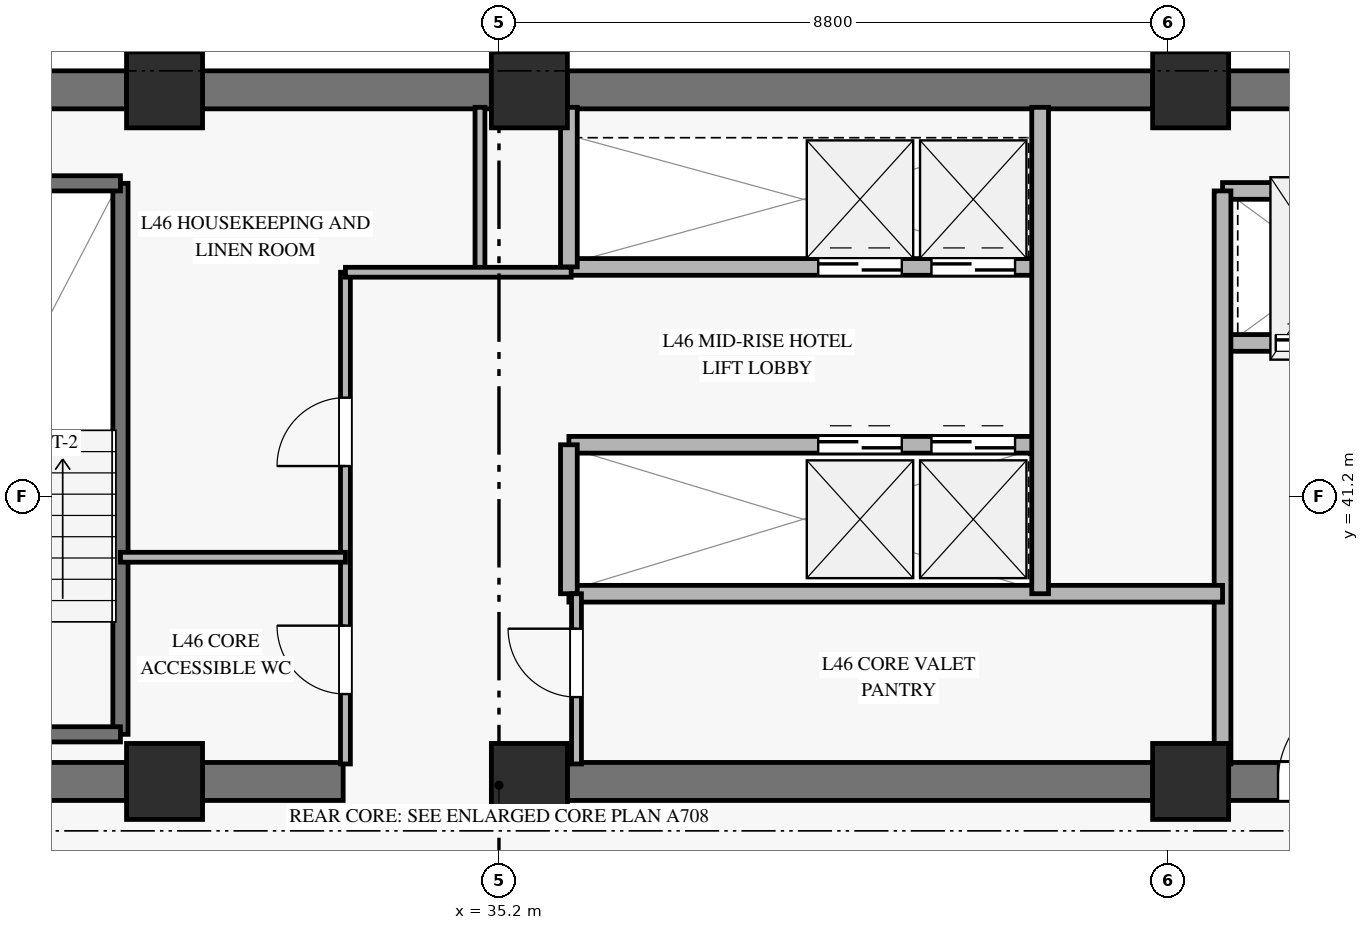
"""IFC4 building model, lengths in metres.
Left out: names, types, materials, properties, quantities, classifications, styles, units other than length and angle.
Written with IfcOpenShell. Run it as: python <this file> out.ifc"""

import sys

from ifc_helpers import new_model, si_unit, direction, frame, frame_2d, origin, origin_2d, place, context, subcontext, project, spatial, rectangle, extrude, source, transform, mapped, element, fill, save


model = new_model("IFC4")
c1 = context("Model", 3, precision=1e-05, world=origin(), true_north=direction((0.0, 1.0)))
c2 = subcontext(c1, "Body", "Model", "MODEL_VIEW")
j1 = project(units=[si_unit("LENGTHUNIT", "METRE"), si_unit("PLANEANGLEUNIT", "RADIAN")], contexts=[c1])
p1 = place(None, origin())
s1 = spatial("IfcSite", under=j1, at=p1, CompositionType="ELEMENT")
p2 = place(p1, origin())
s2 = spatial("IfcBuilding", under=s1, at=p2, CompositionType="ELEMENT")
p3 = place(p2, frame((0.0, 0.0, 184.2)))
s3 = spatial("IfcBuildingStorey", under=s2, at=p3, CompositionType="ELEMENT", Elevation=184.2)
m1 = source(origin(), c2, "Body", "SweptSolid", [
    extrude(rectangle(XDim=1.0, YDim=1.0, at=origin_2d()), origin(), (0.0, 0.0, 1.0), 3.27),
])
for number, where, z_axis, x_axis in (
    (1, (30.8, 37.45, 0.0), (0.0, 0.0, 1.0), (1.0, 0.0, 0.0)),
    (2, (30.8, 46.55, 0.0), (0.0, 0.0, 1.0), (1.0, 0.0, 0.0)),
    (3, (35.6, 37.45, 0.0), (0.0, 0.0, 1.0), (1.0, 0.0, 0.0)),
    (4, (35.6, 46.55, 0.0), (0.0, 0.0, 1.0), (1.0, 0.0, 0.0)),
    (5, (44.3, 37.45, 0.0), (0.0, 0.0, 1.0), (1.0, 0.0, 0.0)),
    (6, (44.3, 46.55, 0.0), (0.0, 0.0, 1.0), (1.0, 0.0, 0.0)),
):
    element("IfcColumn", number, at=place(p3, frame(where, z_axis=z_axis, x_axis=x_axis)), inside=s3, PredefinedType="PILASTER", context=c2, shape_type="MappedRepresentation", body=[
        mapped(m1, transform((0.0, 0.0, 0.0), x_axis=(1.0, 0.0, 0.0), y_axis=(0.0, 1.0, 0.0), z_axis=(0.0, 0.0, 1.0), scale=1.0)),
    ])
p4 = place(p3, frame((20.35, 46.55, 0.0), z_axis=(0.0, 0.0, 1.0), x_axis=(1.0, 0.0, 0.0)))
e7 = element("IfcWall", 7, at=p4, inside=s3, PredefinedType="SHEAR", context=c2, shape_type="SweptSolid", body=[
    extrude(rectangle(XDim=9.95, YDim=0.5, at=frame_2d((4.975, 0.0))), origin(), (0.0, 0.0, 1.0), 3.27),
])
p5 = place(p3, frame((31.3, 46.55, 0.0), z_axis=(0.0, 0.0, 1.0), x_axis=(1.0, 0.0, 0.0)))
e8 = element("IfcWall", 8, at=p5, inside=s3, PredefinedType="SHEAR", context=c2, shape_type="SweptSolid", body=[
    extrude(rectangle(XDim=3.8, YDim=0.5, at=frame_2d((1.9, 0.0))), origin(), (0.0, 0.0, 1.0), 3.27),
])
p6 = place(p3, frame((36.1, 46.55, 0.0), z_axis=(0.0, 0.0, 1.0), x_axis=(1.0, 0.0, 0.0)))
e9 = element("IfcWall", 9, at=p6, inside=s3, PredefinedType="SHEAR", context=c2, shape_type="SweptSolid", body=[
    extrude(rectangle(XDim=7.7, YDim=0.5, at=frame_2d((3.85, 0.0))), origin(), (0.0, 0.0, 1.0), 3.27),
])
p7 = place(p3, frame((44.8, 46.55, 0.0), z_axis=(0.0, 0.0, 1.0), x_axis=(1.0, 0.0, 0.0)))
e10 = element("IfcWall", 10, at=p7, inside=s3, PredefinedType="SHEAR", context=c2, shape_type="SweptSolid", body=[
    extrude(rectangle(XDim=5.25, YDim=0.5, at=frame_2d((2.625, 0.0))), origin(), (0.0, 0.0, 1.0), 3.27),
])
p8 = place(p3, frame((20.35, 37.45, 0.0), z_axis=(0.0, 0.0, 1.0), x_axis=(1.0, 0.0, 0.0)))
e11 = element("IfcWall", 11, at=p8, inside=s3, PredefinedType="SHEAR", context=c2, shape_type="SweptSolid", body=[
    extrude(rectangle(XDim=9.95, YDim=0.5, at=frame_2d((4.975, 0.0))), origin(), (0.0, 0.0, 1.0), 3.27),
])
p9 = place(p8, frame((4.2, 0.0, 0.0)))
e12 = element("IfcOpeningElement", 12, at=p9, cuts=e11, PredefinedType="OPENING", context=c2, shape_type="SweptSolid", body=[
    extrude(rectangle(XDim=1.2, YDim=2.15, at=frame_2d((0.6, 1.075))), frame((0.0, 0.26, 0.0), z_axis=(0.0, -1.0, 0.0), x_axis=(1.0, 0.0, 0.0)), (0.0, 0.0, 1.0), 0.52),
])
p10 = place(p3, frame((31.3, 37.45, 0.0), z_axis=(0.0, 0.0, 1.0), x_axis=(1.0, 0.0, 0.0)))
e13 = element("IfcWall", 13, at=p10, inside=s3, PredefinedType="SHEAR", context=c2, shape_type="SweptSolid", body=[
    extrude(rectangle(XDim=1.85, YDim=0.5, at=frame_2d((0.925, 0.0))), origin(), (0.0, 0.0, 1.0), 3.27),
])
p11 = place(p3, frame((36.1, 37.45, 0.0), z_axis=(0.0, 0.0, 1.0), x_axis=(1.0, 0.0, 0.0)))
e14 = element("IfcWall", 14, at=p11, inside=s3, PredefinedType="SHEAR", context=c2, shape_type="SweptSolid", body=[
    extrude(rectangle(XDim=7.7, YDim=0.5, at=frame_2d((3.85, 0.0))), origin(), (0.0, 0.0, 1.0), 3.27),
])
p12 = place(p3, frame((44.8, 37.45, 0.0), z_axis=(0.0, 0.0, 1.0), x_axis=(1.0, 0.0, 0.0)))
e15 = element("IfcWall", 15, at=p12, inside=s3, PredefinedType="SHEAR", context=c2, shape_type="SweptSolid", body=[
    extrude(rectangle(XDim=5.25, YDim=0.5, at=frame_2d((2.625, 0.0))), origin(), (0.0, 0.0, 1.0), 3.27),
])
p13 = place(p12, frame((0.65, 0.0, 0.0)))
e16 = element("IfcOpeningElement", 16, at=p13, cuts=e15, PredefinedType="OPENING", context=c2, shape_type="SweptSolid", body=[
    extrude(rectangle(XDim=1.2, YDim=2.15, at=frame_2d((0.6, 1.075))), frame((0.0, 0.26, 0.0), z_axis=(0.0, -1.0, 0.0), x_axis=(1.0, 0.0, 0.0)), (0.0, 0.0, 1.0), 0.52),
])
p14 = place(p3, frame((30.22, 38.07, 0.0), z_axis=(0.0, 0.0, 1.0), x_axis=(0.0, 1.0, 0.0)))
e17 = element("IfcWall", 17, at=p14, inside=s3, PredefinedType="SOLIDWALL", context=c2, shape_type="SweptSolid", body=[
    extrude(rectangle(XDim=7.25, YDim=0.2, at=frame_2d((3.625, 0.0))), origin(), (0.0, 0.0, 1.0), 3.5),
])
for number, where, z_axis, x_axis in (
    (18, (27.14, 45.32, 0.0), (0.0, 0.0, 1.0), (1.0, 0.0, 0.0)),
    (19, (27.14, 38.07, 0.0), (0.0, 0.0, 1.0), (1.0, 0.0, 0.0)),
):
    element("IfcWall", number, at=place(p3, frame(where, z_axis=z_axis, x_axis=x_axis)), inside=s3, PredefinedType="SOLIDWALL", context=c2, shape_type="SweptSolid", body=[
        extrude(rectangle(XDim=3.08, YDim=0.2, at=frame_2d((1.54, 0.0))), origin(), (0.0, 0.0, 1.0), 3.5),
    ])
p15 = place(p3, frame((44.72, 43.22, 0.0), z_axis=(0.0, 0.0, 1.0), x_axis=(1.0, 0.0, 0.0)))
e20 = element("IfcWall", 20, at=p15, inside=s3, PredefinedType="SOLIDWALL", context=c2, shape_type="SweptSolid", body=[
    extrude(rectangle(XDim=2.72, YDim=0.22, at=frame_2d((1.36, 0.0))), origin(), (0.0, 0.0, 1.0), 3.27),
])
p16 = place(p15, frame((0.7, 0.0, 0.0)))
e21 = element("IfcOpeningElement", 21, at=p16, cuts=e20, PredefinedType="OPENING", context=c2, shape_type="SweptSolid", body=[
    extrude(rectangle(XDim=1.1, YDim=2.2, at=frame_2d((0.55, 1.1))), frame((0.0, 0.12, 0.0), z_axis=(0.0, -1.0, 0.0), x_axis=(1.0, 0.0, 0.0)), (0.0, 0.0, 1.0), 0.24),
])
p17 = place(p3, frame((44.72, 45.22, 0.0), z_axis=(0.0, 0.0, 1.0), x_axis=(1.0, 0.0, 0.0)))
e22 = element("IfcWall", 22, at=p17, inside=s3, PredefinedType="SOLIDWALL", context=c2, shape_type="SweptSolid", body=[
    extrude(rectangle(XDim=2.72, YDim=0.22, at=frame_2d((1.36, 0.0))), origin(), (0.0, 0.0, 1.0), 3.27),
])
p18 = place(p3, frame((44.72, 37.68, 0.0), z_axis=(0.0, 0.0, 1.0), x_axis=(0.0, 1.0, 0.0)))
e23 = element("IfcWall", 23, at=p18, inside=s3, PredefinedType="SOLIDWALL", context=c2, shape_type="SweptSolid", body=[
    extrude(rectangle(XDim=7.54, YDim=0.22, at=frame_2d((3.77, 0.0))), origin(), (0.0, 0.0, 1.0), 3.27),
])
p19 = place(p3, frame((36.12, 44.22, 0.0), z_axis=(0.0, 0.0, 1.0), x_axis=(1.0, 0.0, 0.0)))
e24 = element("IfcWall", 24, at=p19, inside=s3, PredefinedType="SOLIDWALL", context=c2, shape_type="SweptSolid", body=[
    extrude(rectangle(XDim=6.2, YDim=0.22, at=frame_2d((3.1, 0.0))), origin(), (0.0, 0.0, 1.0), 3.27),
])
p20 = place(p19, frame((3.28, 0.0, 0.0)))
e25 = element("IfcOpeningElement", 25, at=p20, cuts=e24, PredefinedType="OPENING", context=c2, shape_type="SweptSolid", body=[
    extrude(rectangle(XDim=1.1, YDim=2.2, at=frame_2d((0.55, 1.1))), frame((0.0, 0.12, 0.0), z_axis=(0.0, -1.0, 0.0), x_axis=(1.0, 0.0, 0.0)), (0.0, 0.0, 1.0), 0.24),
])
p21 = place(p19, frame((4.77, 0.0, 0.0)))
e26 = element("IfcOpeningElement", 26, at=p21, cuts=e24, PredefinedType="OPENING", context=c2, shape_type="SweptSolid", body=[
    extrude(rectangle(XDim=1.1, YDim=2.2, at=frame_2d((0.55, 1.1))), frame((0.0, 0.12, 0.0), z_axis=(0.0, -1.0, 0.0), x_axis=(1.0, 0.0, 0.0)), (0.0, 0.0, 1.0), 0.24),
])
p22 = place(p3, frame((36.12, 41.88, 0.0), z_axis=(0.0, 0.0, 1.0), x_axis=(1.0, 0.0, 0.0)))
e27 = element("IfcWall", 27, at=p22, inside=s3, PredefinedType="SOLIDWALL", context=c2, shape_type="SweptSolid", body=[
    extrude(rectangle(XDim=6.2, YDim=0.22, at=frame_2d((3.1, 0.0))), origin(), (0.0, 0.0, 1.0), 3.27),
])
p23 = place(p22, frame((3.28, 0.0, 0.0)))
e28 = element("IfcOpeningElement", 28, at=p23, cuts=e27, PredefinedType="OPENING", context=c2, shape_type="SweptSolid", body=[
    extrude(rectangle(XDim=1.1, YDim=2.2, at=frame_2d((0.55, 1.1))), frame((0.0, 0.12, 0.0), z_axis=(0.0, -1.0, 0.0), x_axis=(1.0, 0.0, 0.0)), (0.0, 0.0, 1.0), 0.24),
])
p24 = place(p22, frame((4.77, 0.0, 0.0)))
e29 = element("IfcOpeningElement", 29, at=p24, cuts=e27, PredefinedType="OPENING", context=c2, shape_type="SweptSolid", body=[
    extrude(rectangle(XDim=1.1, YDim=2.2, at=frame_2d((0.55, 1.1))), frame((0.0, 0.12, 0.0), z_axis=(0.0, -1.0, 0.0), x_axis=(1.0, 0.0, 0.0)), (0.0, 0.0, 1.0), 0.24),
])
p25 = place(p3, frame((36.12, 39.92, 0.0), z_axis=(0.0, 0.0, 1.0), x_axis=(1.0, 0.0, 0.0)))
e30 = element("IfcWall", 30, at=p25, inside=s3, PredefinedType="SOLIDWALL", context=c2, shape_type="SweptSolid", body=[
    extrude(rectangle(XDim=8.6, YDim=0.22, at=frame_2d((4.3, 0.0))), origin(), (0.0, 0.0, 1.0), 2.555),
])
p26 = place(p3, frame((42.32, 39.92, 0.0), z_axis=(0.0, 0.0, 1.0), x_axis=(0.0, 1.0, 0.0)))
e31 = element("IfcWall", 31, at=p26, inside=s3, PredefinedType="SOLIDWALL", context=c2, shape_type="SweptSolid", body=[
    extrude(rectangle(XDim=6.4, YDim=0.22, at=frame_2d((3.2, 0.0))), origin(), (0.0, 0.0, 1.0), 3.27),
])
p27 = place(p3, frame((36.12, 39.92, 0.0), z_axis=(0.0, 0.0, 1.0), x_axis=(0.0, 1.0, 0.0)))
e32 = element("IfcWall", 32, at=p27, inside=s3, PredefinedType="SOLIDWALL", context=c2, shape_type="SweptSolid", body=[
    extrude(rectangle(XDim=1.96, YDim=0.22, at=frame_2d((0.98, 0.0))), origin(), (0.0, 0.0, 1.0), 3.27),
])
p28 = place(p3, frame((36.12, 44.22, 0.0), z_axis=(0.0, 0.0, 1.0), x_axis=(0.0, 1.0, 0.0)))
e33 = element("IfcWall", 33, at=p28, inside=s3, PredefinedType="SOLIDWALL", context=c2, shape_type="SweptSolid", body=[
    extrude(rectangle(XDim=2.1, YDim=0.22, at=frame_2d((1.05, 0.0))), origin(), (0.0, 0.0, 1.0), 3.27),
])
p29 = place(p3, frame((33.18, 37.68, 0.0), z_axis=(0.0, 0.0, 1.0), x_axis=(0.0, 1.0, 0.0)))
e34 = element("IfcWall", 34, at=p29, inside=s3, PredefinedType="PARTITIONING", context=c2, shape_type="SweptSolid", body=[
    extrude(rectangle(XDim=6.47, YDim=0.13, at=frame_2d((3.235, 0.0))), origin(), (0.0, 0.0, 1.0), 2.355),
])
p30 = place(p29, frame((0.92, 0.0, 0.0)))
e35 = element("IfcOpeningElement", 35, at=p30, cuts=e34, PredefinedType="OPENING", context=c2, shape_type="SweptSolid", body=[
    extrude(rectangle(XDim=0.9, YDim=2.1, at=frame_2d((0.45, 1.05))), frame((0.0, 0.075, 0.0), z_axis=(0.0, -1.0, 0.0), x_axis=(1.0, 0.0, 0.0)), (0.0, 0.0, 1.0), 0.15),
])
p31 = place(p29, frame((3.92, 0.0, 0.0)))
e36 = element("IfcOpeningElement", 36, at=p31, cuts=e34, PredefinedType="OPENING", context=c2, shape_type="SweptSolid", body=[
    extrude(rectangle(XDim=0.9, YDim=2.1, at=frame_2d((0.45, 1.05))), frame((0.0, 0.075, 0.0), z_axis=(0.0, -1.0, 0.0), x_axis=(1.0, 0.0, 0.0)), (0.0, 0.0, 1.0), 0.15),
])
p32 = place(p3, frame((34.95, 44.15, 0.0), z_axis=(0.0, 0.0, 1.0), x_axis=(0.0, 1.0, 0.0)))
e37 = element("IfcWall", 37, at=p32, inside=s3, PredefinedType="PARTITIONING", context=c2, shape_type="SweptSolid", body=[
    extrude(rectangle(XDim=2.17, YDim=0.13, at=frame_2d((1.085, 0.0))), origin(), (0.0, 0.0, 1.0), 3.27),
])
p33 = place(p3, frame((33.18, 44.15, 0.0), z_axis=(0.0, 0.0, 1.0), x_axis=(1.0, 0.0, 0.0)))
e38 = element("IfcWall", 38, at=p33, inside=s3, PredefinedType="PARTITIONING", context=c2, shape_type="SweptSolid", body=[
    extrude(rectangle(XDim=2.97, YDim=0.13, at=frame_2d((1.485, 0.0))), origin(), (0.0, 0.0, 1.0), 2.555),
])
p34 = place(p3, frame((30.22, 40.4, 0.0), z_axis=(0.0, 0.0, 1.0), x_axis=(1.0, 0.0, 0.0)))
e39 = element("IfcWall", 39, at=p34, inside=s3, PredefinedType="PARTITIONING", context=c2, shape_type="SweptSolid", body=[
    extrude(rectangle(XDim=2.96, YDim=0.13, at=frame_2d((1.48, 0.0))), origin(), (0.0, 0.0, 1.0), 2.555),
])
p35 = place(p3, frame((36.22, 37.68, 0.0), z_axis=(0.0, 0.0, 1.0), x_axis=(0.0, 1.0, 0.0)))
e40 = element("IfcWall", 40, at=p35, inside=s3, PredefinedType="PARTITIONING", context=c2, shape_type="SweptSolid", body=[
    extrude(rectangle(XDim=2.24, YDim=0.13, at=frame_2d((1.12, 0.0))), origin(), (0.0, 0.0, 1.0), 3.27),
])
p36 = place(p35, frame((0.88, 0.0, 0.0)))
e41 = element("IfcOpeningElement", 41, at=p36, cuts=e40, PredefinedType="OPENING", context=c2, shape_type="SweptSolid", body=[
    extrude(rectangle(XDim=0.9, YDim=2.1, at=frame_2d((0.45, 1.05))), frame((0.0, 0.075, 0.0), z_axis=(0.0, -1.0, 0.0), x_axis=(1.0, 0.0, 0.0)), (0.0, 0.0, 1.0), 0.15),
])
m2 = source(origin(), c2, "Body", "SweptSolid", [
    extrude(rectangle(XDim=1.1, YDim=2.2, at=frame_2d((0.55, 1.1))), frame((0.0, 0.025, 0.0), z_axis=(0.0, -1.0, 0.0), x_axis=(1.0, 0.0, 0.0)), (0.0, 0.0, 1.0), 0.05),
])
p37 = place(p16, origin())
e42 = element("IfcDoor", 42, at=p37, inside=s3, OperationType="SLIDING_TO_LEFT", PredefinedType="DOOR", context=c2, shape_type="MappedRepresentation", body=[
    mapped(m2, transform((0.0, 0.0, 0.0), x_axis=(1.0, 0.0, 0.0), y_axis=(0.0, 1.0, 0.0), z_axis=(0.0, 0.0, 1.0), scale=1.0)),
])
fill(e21, e42)
m3 = source(origin(), c2, "Body", "SweptSolid", [
    extrude(rectangle(XDim=1.2, YDim=2.15, at=frame_2d((0.6, 1.075))), frame((0.0, 0.025, 0.0), z_axis=(0.0, -1.0, 0.0), x_axis=(1.0, 0.0, 0.0)), (0.0, 0.0, 1.0), 0.05),
])
p38 = place(p13, origin())
e43 = element("IfcDoor", 43, at=p38, inside=s3, OperationType="SINGLE_SWING_RIGHT", PredefinedType="DOOR", context=c2, shape_type="MappedRepresentation", body=[
    mapped(m3, transform((0.0, 0.0, 0.0), x_axis=(1.0, 0.0, 0.0), y_axis=(0.0, 1.0, 0.0), z_axis=(0.0, 0.0, 1.0), scale=1.0)),
])
fill(e16, e43)
p39 = place(p20, origin())
e44 = element("IfcDoor", 44, at=p39, inside=s3, OperationType="SLIDING_TO_LEFT", PredefinedType="DOOR", context=c2, shape_type="MappedRepresentation", body=[
    mapped(m2, transform((0.0, 0.0, 0.0), x_axis=(1.0, 0.0, 0.0), y_axis=(0.0, 1.0, 0.0), z_axis=(0.0, 0.0, 1.0), scale=1.0)),
])
fill(e25, e44)
p40 = place(p21, origin())
e45 = element("IfcDoor", 45, at=p40, inside=s3, OperationType="SLIDING_TO_LEFT", PredefinedType="DOOR", context=c2, shape_type="MappedRepresentation", body=[
    mapped(m2, transform((0.0, 0.0, 0.0), x_axis=(1.0, 0.0, 0.0), y_axis=(0.0, 1.0, 0.0), z_axis=(0.0, 0.0, 1.0), scale=1.0)),
])
fill(e26, e45)
p41 = place(p23, origin())
e46 = element("IfcDoor", 46, at=p41, inside=s3, OperationType="SLIDING_TO_LEFT", PredefinedType="DOOR", context=c2, shape_type="MappedRepresentation", body=[
    mapped(m2, transform((0.0, 0.0, 0.0), x_axis=(1.0, 0.0, 0.0), y_axis=(0.0, 1.0, 0.0), z_axis=(0.0, 0.0, 1.0), scale=1.0)),
])
fill(e28, e46)
p42 = place(p24, origin())
e47 = element("IfcDoor", 47, at=p42, inside=s3, OperationType="SLIDING_TO_LEFT", PredefinedType="DOOR", context=c2, shape_type="MappedRepresentation", body=[
    mapped(m2, transform((0.0, 0.0, 0.0), x_axis=(1.0, 0.0, 0.0), y_axis=(0.0, 1.0, 0.0), z_axis=(0.0, 0.0, 1.0), scale=1.0)),
])
fill(e29, e47)
m4 = source(origin(), c2, "Body", "SweptSolid", [
    extrude(rectangle(XDim=0.9, YDim=2.1, at=frame_2d((0.45, 1.05))), frame((0.0, 0.025, 0.0), z_axis=(0.0, -1.0, 0.0), x_axis=(1.0, 0.0, 0.0)), (0.0, 0.0, 1.0), 0.05),
])
p43 = place(p30, origin())
e48 = element("IfcDoor", 48, at=p43, inside=s3, OperationType="SINGLE_SWING_RIGHT", PredefinedType="DOOR", context=c2, shape_type="MappedRepresentation", body=[
    mapped(m4, transform((0.0, 0.0, 0.0), x_axis=(1.0, 0.0, 0.0), y_axis=(0.0, 1.0, 0.0), z_axis=(0.0, 0.0, 1.0), scale=1.0)),
])
fill(e35, e48)
p44 = place(p31, origin())
e49 = element("IfcDoor", 49, at=p44, inside=s3, OperationType="SINGLE_SWING_LEFT", PredefinedType="DOOR", context=c2, shape_type="MappedRepresentation", body=[
    mapped(m4, transform((0.0, 0.0, 0.0), x_axis=(1.0, 0.0, 0.0), y_axis=(0.0, 1.0, 0.0), z_axis=(0.0, 0.0, 1.0), scale=1.0)),
])
fill(e36, e49)
p45 = place(p36, origin())
e50 = element("IfcDoor", 50, at=p45, inside=s3, OperationType="SINGLE_SWING_RIGHT", PredefinedType="DOOR", context=c2, shape_type="MappedRepresentation", body=[
    mapped(m4, transform((0.0, 0.0, 0.0), x_axis=(1.0, 0.0, 0.0), y_axis=(0.0, 1.0, 0.0), z_axis=(0.0, 0.0, 1.0), scale=1.0)),
])
fill(e41, e50)
save(model, sys.argv[1])
